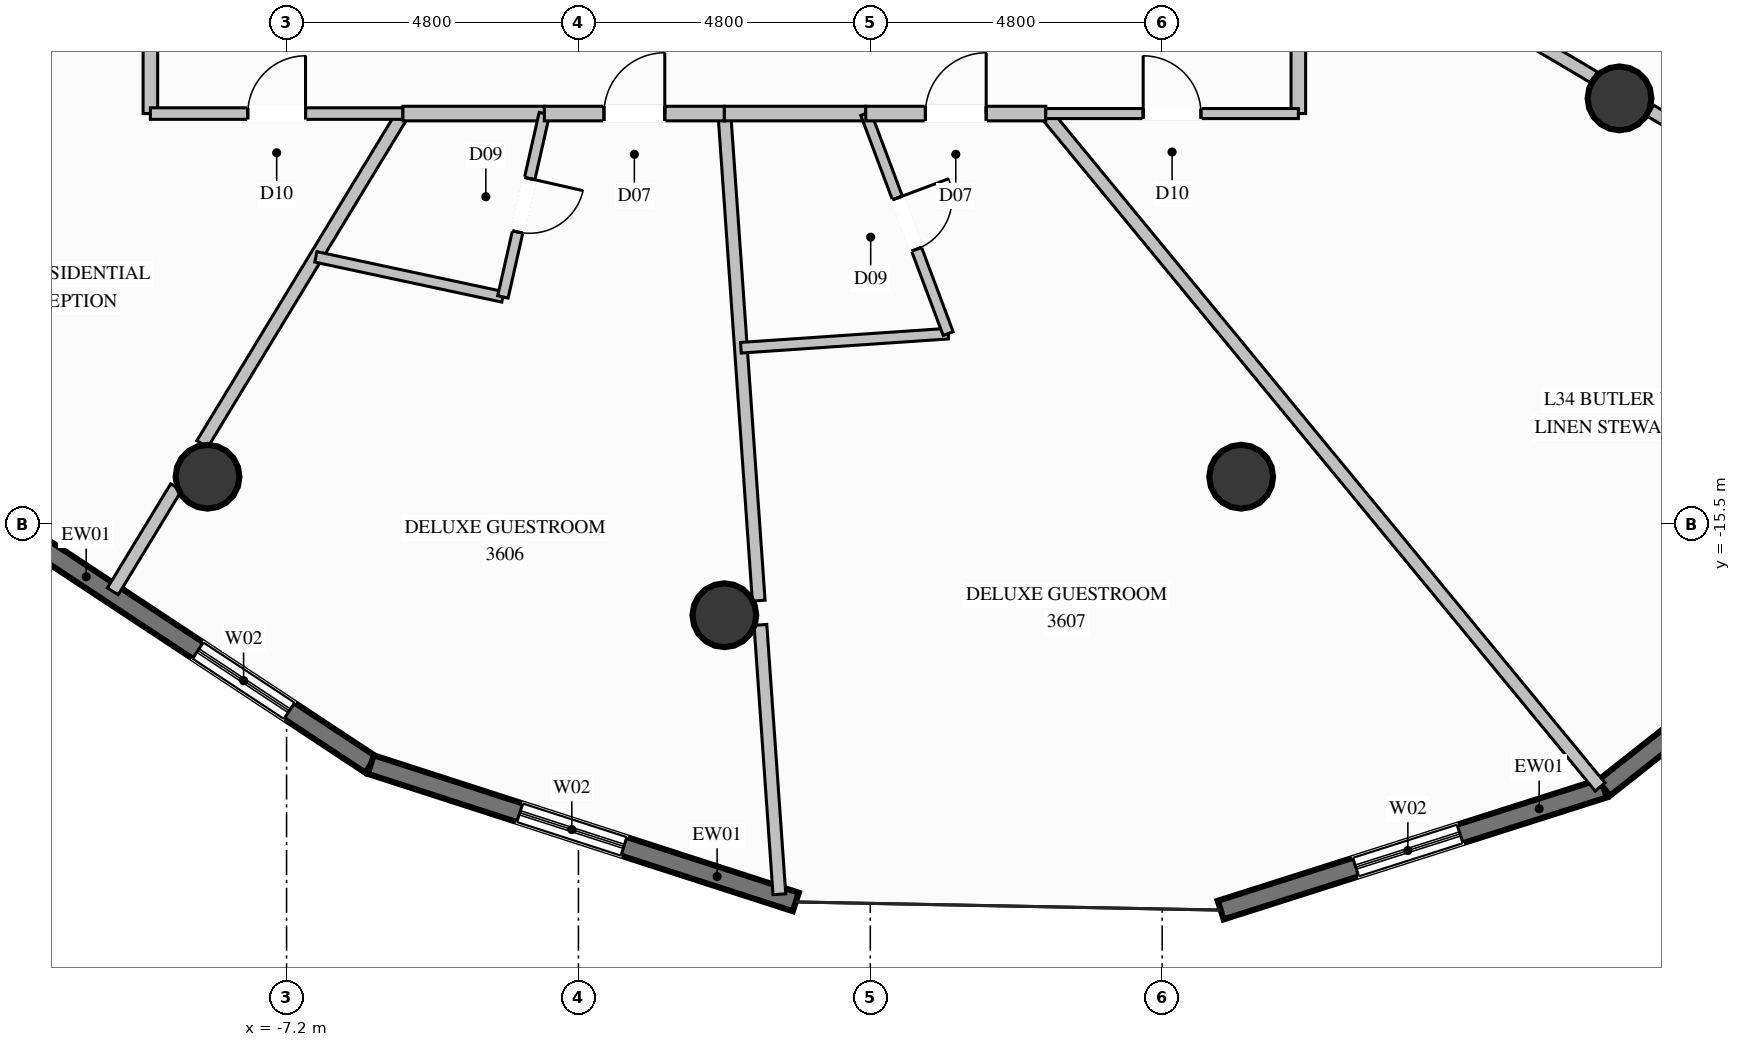
"""IFC4 building model, lengths in metres.
Left out: names, types, materials, properties, quantities, classifications, styles, units other than length and angle.
Written with IfcOpenShell. Run it as: python <this file> out.ifc"""

import sys

from ifc_helpers import new_model, si_unit, direction, frame, frame_2d, origin, origin_2d, place, context, subcontext, project, spatial, rectangle, circle, extrude, element, fill, save


model = new_model("IFC4")
c1 = context("Model", 3, precision=1e-05, world=origin(), true_north=direction((0.0, 1.0)))
c2 = subcontext(c1, "Body", "Model", "MODEL_VIEW")
j1 = project(units=[si_unit("LENGTHUNIT", "METRE"), si_unit("PLANEANGLEUNIT", "RADIAN")], contexts=[c1])
p1 = place(None, origin())
s1 = spatial("IfcSite", under=j1, at=p1, CompositionType="ELEMENT")
p2 = place(p1, origin())
s2 = spatial("IfcBuilding", under=s1, at=p2, CompositionType="ELEMENT")
p3 = place(p2, frame((0.0, 0.0, 135.0)))
s3 = spatial("IfcBuildingStorey", under=s2, at=p3, CompositionType="ELEMENT", Elevation=135.0)
for number, where, z_axis, x_axis in (
    (1, (-8.5, -14.722, 0.0), (0.0, 0.0, 1.0), (1.0, 0.0, 0.0)),
    (2, (0.0, -17.0, 0.0), (0.0, 0.0, 1.0), (1.0, 0.0, 0.0)),
    (3, (8.5, -14.722, 0.0), (0.0, 0.0, 1.0), (1.0, 0.0, 0.0)),
    (4, (14.722, -8.5, 0.0), (0.0, 0.0, 1.0), (1.0, 0.0, 0.0)),
):
    element("IfcColumn", number, at=place(p3, frame(where, z_axis=z_axis, x_axis=x_axis)), inside=s3, PredefinedType="COLUMN", context=c2, shape_type="SweptSolid", body=[
        extrude(circle(Radius=0.525, at=origin_2d()), origin(), (0.0, 0.0, 1.0), 3.6),
    ])
p4 = place(p3, frame((-5.816, -19.456, 0.0), z_axis=(0.0, 0.0, 1.0), x_axis=(-0.834605249122, 0.550848507431, 0.0)))
e5 = element("IfcWall", 5, at=p4, inside=s3, PredefinedType="SOLIDWALL", context=c2, shape_type="SweptSolid", body=[
    extrude(rectangle(XDim=7.559, YDim=0.32, at=frame_2d((3.78, 0.0))), origin(), (0.0, 0.0, 1.0), 3.35),
])
p5 = place(p4, frame((1.605, 0.0, 0.35)))
e6 = element("IfcOpeningElement", 6, at=p5, cuts=e5, PredefinedType="OPENING", context=c2, shape_type="SweptSolid", body=[
    extrude(rectangle(XDim=1.8, YDim=2.6, at=frame_2d((0.9, 1.3))), frame((0.0, 0.17, 0.0), z_axis=(0.0, -1.0, 0.0), x_axis=(1.0, 0.0, 0.0)), (0.0, 0.0, 1.0), 0.34),
])
p6 = place(p3, frame((1.175, -21.715, 0.0), z_axis=(0.0, 0.0, 1.0), x_axis=(-0.951554090089, 0.307481403722, 0.0)))
e7 = element("IfcWall", 7, at=p6, inside=s3, PredefinedType="SOLIDWALL", context=c2, shape_type="SweptSolid", body=[
    extrude(rectangle(XDim=7.347, YDim=0.32, at=frame_2d((3.673, 0.0))), origin(), (0.0, 0.0, 1.0), 3.35),
])
p7 = place(p6, frame((2.971, 0.0, 0.35)))
e8 = element("IfcOpeningElement", 8, at=p7, cuts=e7, PredefinedType="OPENING", context=c2, shape_type="SweptSolid", body=[
    extrude(rectangle(XDim=1.8, YDim=2.6, at=frame_2d((0.9, 1.3))), frame((0.0, 0.17, 0.0), z_axis=(0.0, -1.0, 0.0), x_axis=(1.0, 0.0, 0.0)), (0.0, 0.0, 1.0), 0.34),
])
p8 = place(p3, frame((14.464, -19.844, 0.0), z_axis=(0.0, 0.0, 1.0), x_axis=(-0.952914626631, -0.303238708533, 0.0)))
e9 = element("IfcWall", 9, at=p8, inside=s3, PredefinedType="SOLIDWALL", context=c2, shape_type="SweptSolid", body=[
    extrude(rectangle(XDim=6.612, YDim=0.32, at=frame_2d((3.306, 0.0))), origin(), (0.0, 0.0, 1.0), 3.35),
])
p9 = place(p8, frame((2.482, 0.0, 0.35)))
e10 = element("IfcOpeningElement", 10, at=p9, cuts=e9, PredefinedType="OPENING", context=c2, shape_type="SweptSolid", body=[
    extrude(rectangle(XDim=1.8, YDim=2.6, at=frame_2d((0.9, 1.3))), frame((0.0, 0.17, 0.0), z_axis=(0.0, -1.0, 0.0), x_axis=(1.0, 0.0, 0.0)), (0.0, 0.0, 1.0), 0.34),
])
p10 = place(p3, frame((19.463, -15.897, 0.0), z_axis=(0.0, 0.0, 1.0), x_axis=(-0.784835666651, -0.619703942503, 0.0)))
e11 = element("IfcWall", 11, at=p10, inside=s3, PredefinedType="SOLIDWALL", context=c2, shape_type="SweptSolid", body=[
    extrude(rectangle(XDim=6.369, YDim=0.32, at=frame_2d((3.185, 0.0))), origin(), (0.0, 0.0, 1.0), 3.35),
])
p11 = place(p10, frame((2.92, 0.0, 0.35)))
e12 = element("IfcOpeningElement", 12, at=p11, cuts=e11, PredefinedType="OPENING", context=c2, shape_type="SweptSolid", body=[
    extrude(rectangle(XDim=1.8, YDim=2.6, at=frame_2d((0.9, 1.3))), frame((0.0, 0.17, 0.0), z_axis=(0.0, -1.0, 0.0), x_axis=(1.0, 0.0, 0.0)), (0.0, 0.0, 1.0), 0.34),
])
p12 = place(p3, frame((-9.44, -5.275, 0.0), z_axis=(0.0, 0.0, 1.0), x_axis=(-0.857218051621, -0.514953601769, 0.0)))
e13 = element("IfcWall", 13, at=p12, inside=s3, PredefinedType="PARTITIONING", context=c2, shape_type="SweptSolid", body=[
    extrude(rectangle(XDim=5.645, YDim=0.21, at=frame_2d((2.823, 0.0))), origin(), (0.0, 0.0, 1.0), 2.717),
])
p13 = place(p3, frame((9.44, -5.275, 0.0), z_axis=(0.0, 0.0, 1.0), x_axis=(0.860527977628, -0.509403179927, 0.0)))
e14 = element("IfcWall", 14, at=p13, inside=s3, PredefinedType="PARTITIONING", context=c2, shape_type="SweptSolid", body=[
    extrude(rectangle(XDim=5.65, YDim=0.21, at=frame_2d((2.825, 0.0))), origin(), (0.0, 0.0, 1.0), 2.717),
])
p14 = place(p3, frame((15.228, -8.701, 0.0), z_axis=(0.0, 0.0, 1.0), x_axis=(0.860535668123, -0.509390188253, 0.0)))
e15 = element("IfcWall", 15, at=p14, inside=s3, PredefinedType="PARTITIONING", context=c2, shape_type="SweptSolid", body=[
    extrude(rectangle(XDim=7.242, YDim=0.21, at=frame_2d((3.621, 0.0))), origin(), (0.0, 0.0, 1.0), 3.35),
])
p15 = place(p3, frame((-5.286, -8.75, 0.0), z_axis=(0.0, 0.0, 1.0), x_axis=(-0.519068318579, -0.854732753934, 0.0)))
e16 = element("IfcWall", 16, at=p15, inside=s3, PredefinedType="PARTITIONING", context=c2, shape_type="SweptSolid", body=[
    extrude(rectangle(XDim=6.358, YDim=0.21, at=frame_2d((3.179, 0.0))), origin(), (0.0, 0.0, 1.0), 2.717),
])
p16 = place(p3, frame((-9.017, -14.894, 0.0), z_axis=(0.0, 0.0, 1.0), x_axis=(-0.519143332801, -0.854687194246, 0.0)))
e17 = element("IfcWall", 17, at=p16, inside=s3, PredefinedType="PARTITIONING", context=c2, shape_type="SweptSolid", body=[
    extrude(rectangle(XDim=2.005, YDim=0.21, at=frame_2d((1.003, 0.0))), origin(), (0.0, 0.0, 1.0), 3.35),
])
p17 = place(p3, frame((-9.44, -5.275, 0.0), z_axis=(0.0, 0.0, 1.0), x_axis=(0.0, -1.0, 0.0)))
e18 = element("IfcWall", 18, at=p17, inside=s3, PredefinedType="PARTITIONING", context=c2, shape_type="SweptSolid", body=[
    extrude(rectangle(XDim=3.475, YDim=0.24, at=frame_2d((1.738, 0.0))), origin(), (0.0, 0.0, 1.0), 3.35),
])
p18 = place(p3, frame((-9.44, -8.75, 0.0), z_axis=(0.0, 0.0, 1.0), x_axis=(1.0, 0.0, 0.0)))
e19 = element("IfcWall", 19, at=p18, inside=s3, PredefinedType="PARTITIONING", context=c2, shape_type="SweptSolid", body=[
    extrude(rectangle(XDim=4.154, YDim=0.19, at=frame_2d((2.077, 0.0))), origin(), (0.0, 0.0, 1.0), 3.35),
])
p19 = place(p18, frame((1.602, 0.0, 0.0)))
e20 = element("IfcOpeningElement", 20, at=p19, cuts=e19, PredefinedType="OPENING", context=c2, shape_type="SweptSolid", body=[
    extrude(rectangle(XDim=0.95, YDim=2.1, at=frame_2d((0.475, 1.05))), frame((0.0, 0.105, 0.0), z_axis=(0.0, -1.0, 0.0), x_axis=(1.0, 0.0, 0.0)), (0.0, 0.0, 1.0), 0.21),
])
p20 = place(p3, frame((-5.286, -8.75, 0.0), z_axis=(0.0, 0.0, 1.0), x_axis=(1.0, 0.0, 0.0)))
e21 = element("IfcWall", 21, at=p20, inside=s3, PredefinedType="PARTITIONING", context=c2, shape_type="SweptSolid", body=[
    extrude(rectangle(XDim=2.326, YDim=0.24, at=frame_2d((1.163, 0.0))), origin(), (0.0, 0.0, 1.0), 3.35),
])
p21 = place(p3, frame((-6.718, -11.107, 0.0), z_axis=(0.0, 0.0, 1.0), x_axis=(0.977878450695, -0.209173936394, 0.0)))
e22 = element("IfcWall", 22, at=p21, inside=s3, PredefinedType="PLUMBINGWALL", context=c2, shape_type="SweptSolid", body=[
    extrude(rectangle(XDim=3.146, YDim=0.175, at=frame_2d((1.573, 0.0))), origin(), (0.0, 0.0, 1.0), 3.35),
])
p22 = place(p3, frame((-2.96, -8.75, 0.0), z_axis=(0.0, 0.0, 1.0), x_axis=(-0.220675389146, -0.975347308719, 0.0)))
e23 = element("IfcWall", 23, at=p22, inside=s3, PredefinedType="PLUMBINGWALL", context=c2, shape_type="SweptSolid", body=[
    extrude(rectangle(XDim=3.091, YDim=0.175, at=frame_2d((1.545, 0.0))), origin(), (0.0, 0.0, 1.0), 3.35),
])
p23 = place(p22, frame((1.096, 0.0, 0.0)))
e24 = element("IfcOpeningElement", 24, at=p23, cuts=e23, PredefinedType="OPENING", context=c2, shape_type="SweptSolid", body=[
    extrude(rectangle(XDim=0.9, YDim=2.1, at=frame_2d((0.45, 1.05))), frame((0.0, 0.098, 0.0), z_axis=(0.0, -1.0, 0.0), x_axis=(1.0, 0.0, 0.0)), (0.0, 0.0, 1.0), 0.195),
])
p24 = place(p3, frame((0.0, -8.75, 0.0), z_axis=(0.0, 0.0, 1.0), x_axis=(0.07035465886, -0.997522040848, 0.0)))
e25 = element("IfcWall", 25, at=p24, inside=s3, PredefinedType="PARTITIONING", context=c2, shape_type="SweptSolid", body=[
    extrude(rectangle(XDim=8.03, YDim=0.21, at=frame_2d((4.015, 0.0))), origin(), (0.0, 0.0, 1.0), 2.717),
])
p25 = place(p3, frame((0.593, -17.159, 0.0), z_axis=(0.0, 0.0, 1.0), x_axis=(0.070273989048, -0.997527727165, 0.0)))
e26 = element("IfcWall", 26, at=p25, inside=s3, PredefinedType="PARTITIONING", context=c2, shape_type="SweptSolid", body=[
    extrude(rectangle(XDim=4.44, YDim=0.21, at=frame_2d((2.22, 0.0))), origin(), (0.0, 0.0, 1.0), 3.35),
])
p26 = place(p3, frame((-2.96, -8.75, 0.0), z_axis=(0.0, 0.0, 1.0), x_axis=(1.0, 0.0, 0.0)))
e27 = element("IfcWall", 27, at=p26, inside=s3, PredefinedType="PARTITIONING", context=c2, shape_type="SweptSolid", body=[
    extrude(rectangle(XDim=2.96, YDim=0.24, at=frame_2d((1.48, 0.0))), origin(), (0.0, 0.0, 1.0), 3.35),
])
p27 = place(p26, frame((0.98, 0.0, 0.0)))
e28 = element("IfcOpeningElement", 28, at=p27, cuts=e27, PredefinedType="OPENING", context=c2, shape_type="SweptSolid", body=[
    extrude(rectangle(XDim=1.0, YDim=2.2, at=frame_2d((0.5, 1.1))), frame((0.0, 0.13, 0.0), z_axis=(0.0, -1.0, 0.0), x_axis=(1.0, 0.0, 0.0)), (0.0, 0.0, 1.0), 0.26),
])
p28 = place(p3, frame((0.0, -8.75, 0.0), z_axis=(0.0, 0.0, 1.0), x_axis=(1.0, 0.0, 0.0)))
e29 = element("IfcWall", 29, at=p28, inside=s3, PredefinedType="PARTITIONING", context=c2, shape_type="SweptSolid", body=[
    extrude(rectangle(XDim=2.326, YDim=0.24, at=frame_2d((1.163, 0.0))), origin(), (0.0, 0.0, 1.0), 3.35),
])
p29 = place(p3, frame((0.272, -12.601, 0.0), z_axis=(0.0, 0.0, 1.0), x_axis=(0.997688649445, 0.067951149869, 0.0)))
e30 = element("IfcWall", 30, at=p29, inside=s3, PredefinedType="PLUMBINGWALL", context=c2, shape_type="SweptSolid", body=[
    extrude(rectangle(XDim=3.417, YDim=0.175, at=frame_2d((1.708, 0.0))), origin(), (0.0, 0.0, 1.0), 3.35),
])
p30 = place(p3, frame((2.326, -8.75, 0.0), z_axis=(0.0, 0.0, 1.0), x_axis=(0.350645655783, -0.936508208229, 0.0)))
e31 = element("IfcWall", 31, at=p30, inside=s3, PredefinedType="PLUMBINGWALL", context=c2, shape_type="SweptSolid", body=[
    extrude(rectangle(XDim=3.864, YDim=0.175, at=frame_2d((1.932, 0.0))), origin(), (0.0, 0.0, 1.0), 3.35),
])
p31 = place(p30, frame((1.482, 0.0, 0.0)))
e32 = element("IfcOpeningElement", 32, at=p31, cuts=e31, PredefinedType="OPENING", context=c2, shape_type="SweptSolid", body=[
    extrude(rectangle(XDim=0.9, YDim=2.1, at=frame_2d((0.45, 1.05))), frame((0.0, 0.098, 0.0), z_axis=(0.0, -1.0, 0.0), x_axis=(1.0, 0.0, 0.0)), (0.0, 0.0, 1.0), 0.195),
])
p32 = place(p3, frame((5.286, -8.75, 0.0), z_axis=(0.0, 0.0, 1.0), x_axis=(0.635601055051, -0.772017680379, 0.0)))
e33 = element("IfcWall", 33, at=p32, inside=s3, PredefinedType="PARTITIONING", context=c2, shape_type="SweptSolid", body=[
    extrude(rectangle(XDim=14.344, YDim=0.21, at=frame_2d((7.172, 0.0))), origin(), (0.0, 0.0, 1.0), 3.35),
])
p33 = place(p3, frame((2.326, -8.75, 0.0), z_axis=(0.0, 0.0, 1.0), x_axis=(1.0, 0.0, 0.0)))
e34 = element("IfcWall", 34, at=p33, inside=s3, PredefinedType="PARTITIONING", context=c2, shape_type="SweptSolid", body=[
    extrude(rectangle(XDim=2.96, YDim=0.24, at=frame_2d((1.48, 0.0))), origin(), (0.0, 0.0, 1.0), 3.35),
])
p34 = place(p33, frame((0.98, 0.0, 0.0)))
e35 = element("IfcOpeningElement", 35, at=p34, cuts=e34, PredefinedType="OPENING", context=c2, shape_type="SweptSolid", body=[
    extrude(rectangle(XDim=1.0, YDim=2.2, at=frame_2d((0.5, 1.1))), frame((0.0, 0.13, 0.0), z_axis=(0.0, -1.0, 0.0), x_axis=(1.0, 0.0, 0.0)), (0.0, 0.0, 1.0), 0.26),
])
p35 = place(p3, frame((9.44, -8.75, 0.0), z_axis=(0.0, 0.0, 1.0), x_axis=(0.0, 1.0, 0.0)))
e36 = element("IfcWall", 36, at=p35, inside=s3, PredefinedType="PARTITIONING", context=c2, shape_type="SweptSolid", body=[
    extrude(rectangle(XDim=3.475, YDim=0.24, at=frame_2d((1.738, 0.0))), origin(), (0.0, 0.0, 1.0), 3.35),
])
p36 = place(p3, frame((5.286, -8.75, 0.0), z_axis=(0.0, 0.0, 1.0), x_axis=(1.0, 0.0, 0.0)))
e37 = element("IfcWall", 37, at=p36, inside=s3, PredefinedType="PARTITIONING", context=c2, shape_type="SweptSolid", body=[
    extrude(rectangle(XDim=4.154, YDim=0.165, at=frame_2d((2.077, 0.0))), origin(), (0.0, 0.0, 1.0), 3.35),
])
p37 = place(p36, frame((1.602, 0.0, 0.0)))
e38 = element("IfcOpeningElement", 38, at=p37, cuts=e37, PredefinedType="OPENING", context=c2, shape_type="SweptSolid", body=[
    extrude(rectangle(XDim=0.95, YDim=2.1, at=frame_2d((0.475, 1.05))), frame((0.0, 0.093, 0.0), z_axis=(0.0, -1.0, 0.0), x_axis=(1.0, 0.0, 0.0)), (0.0, 0.0, 1.0), 0.185),
])
p38 = place(p5, origin())
e39 = element("IfcWindow", 39, at=p38, inside=s3, PartitioningType="SINGLE_PANEL", PredefinedType="WINDOW", context=c2, shape_type="SweptSolid", body=[
    extrude(rectangle(XDim=1.8, YDim=2.6, at=frame_2d((0.9, 1.3))), frame((0.0, 0.03, 0.0), z_axis=(0.0, -1.0, 0.0), x_axis=(1.0, 0.0, 0.0)), (0.0, 0.0, 1.0), 0.06),
])
fill(e6, e39)
p39 = place(p7, origin())
e40 = element("IfcWindow", 40, at=p39, inside=s3, PartitioningType="SINGLE_PANEL", PredefinedType="WINDOW", context=c2, shape_type="SweptSolid", body=[
    extrude(rectangle(XDim=1.8, YDim=2.6, at=frame_2d((0.9, 1.3))), frame((0.0, 0.03, 0.0), z_axis=(0.0, -1.0, 0.0), x_axis=(1.0, 0.0, 0.0)), (0.0, 0.0, 1.0), 0.06),
])
fill(e8, e40)
p40 = place(p9, origin())
e41 = element("IfcWindow", 41, at=p40, inside=s3, PartitioningType="SINGLE_PANEL", PredefinedType="WINDOW", context=c2, shape_type="SweptSolid", body=[
    extrude(rectangle(XDim=1.8, YDim=2.6, at=frame_2d((0.9, 1.3))), frame((0.0, 0.03, 0.0), z_axis=(0.0, -1.0, 0.0), x_axis=(1.0, 0.0, 0.0)), (0.0, 0.0, 1.0), 0.06),
])
fill(e10, e41)
p41 = place(p19, origin())
e42 = element("IfcDoor", 42, at=p41, inside=s3, OperationType="SINGLE_SWING_RIGHT", PredefinedType="DOOR", context=c2, shape_type="SweptSolid", body=[
    extrude(rectangle(XDim=0.95, YDim=2.1, at=frame_2d((0.475, 1.05))), frame((0.0, 0.025, 0.0), z_axis=(0.0, -1.0, 0.0), x_axis=(1.0, 0.0, 0.0)), (0.0, 0.0, 1.0), 0.05),
])
fill(e20, e42)
p42 = place(p23, origin())
e43 = element("IfcDoor", 43, at=p42, inside=s3, OperationType="SINGLE_SWING_LEFT", PredefinedType="DOOR", context=c2, shape_type="SweptSolid", body=[
    extrude(rectangle(XDim=0.9, YDim=2.1, at=frame_2d((0.45, 1.05))), frame((0.0, 0.025, 0.0), z_axis=(0.0, -1.0, 0.0), x_axis=(1.0, 0.0, 0.0)), (0.0, 0.0, 1.0), 0.05),
])
fill(e24, e43)
p43 = place(p27, origin())
e44 = element("IfcDoor", 44, at=p43, inside=s3, OperationType="SINGLE_SWING_RIGHT", PredefinedType="DOOR", context=c2, shape_type="SweptSolid", body=[
    extrude(rectangle(XDim=1.0, YDim=2.2, at=frame_2d((0.5, 1.1))), frame((0.0, 0.025, 0.0), z_axis=(0.0, -1.0, 0.0), x_axis=(1.0, 0.0, 0.0)), (0.0, 0.0, 1.0), 0.05),
])
fill(e28, e44)
p44 = place(p31, origin())
e45 = element("IfcDoor", 45, at=p44, inside=s3, OperationType="SINGLE_SWING_LEFT", PredefinedType="DOOR", context=c2, shape_type="SweptSolid", body=[
    extrude(rectangle(XDim=0.9, YDim=2.1, at=frame_2d((0.45, 1.05))), frame((0.0, 0.025, 0.0), z_axis=(0.0, -1.0, 0.0), x_axis=(1.0, 0.0, 0.0)), (0.0, 0.0, 1.0), 0.05),
])
fill(e32, e45)
p45 = place(p34, origin())
e46 = element("IfcDoor", 46, at=p45, inside=s3, OperationType="SINGLE_SWING_RIGHT", PredefinedType="DOOR", context=c2, shape_type="SweptSolid", body=[
    extrude(rectangle(XDim=1.0, YDim=2.2, at=frame_2d((0.5, 1.1))), frame((0.0, 0.025, 0.0), z_axis=(0.0, -1.0, 0.0), x_axis=(1.0, 0.0, 0.0)), (0.0, 0.0, 1.0), 0.05),
])
fill(e35, e46)
p46 = place(p37, origin())
e47 = element("IfcDoor", 47, at=p46, inside=s3, OperationType="SINGLE_SWING_LEFT", PredefinedType="DOOR", context=c2, shape_type="SweptSolid", body=[
    extrude(rectangle(XDim=0.95, YDim=2.1, at=frame_2d((0.475, 1.05))), frame((0.0, 0.025, 0.0), z_axis=(0.0, -1.0, 0.0), x_axis=(1.0, 0.0, 0.0)), (0.0, 0.0, 1.0), 0.05),
])
fill(e38, e47)
save(model, sys.argv[1])
